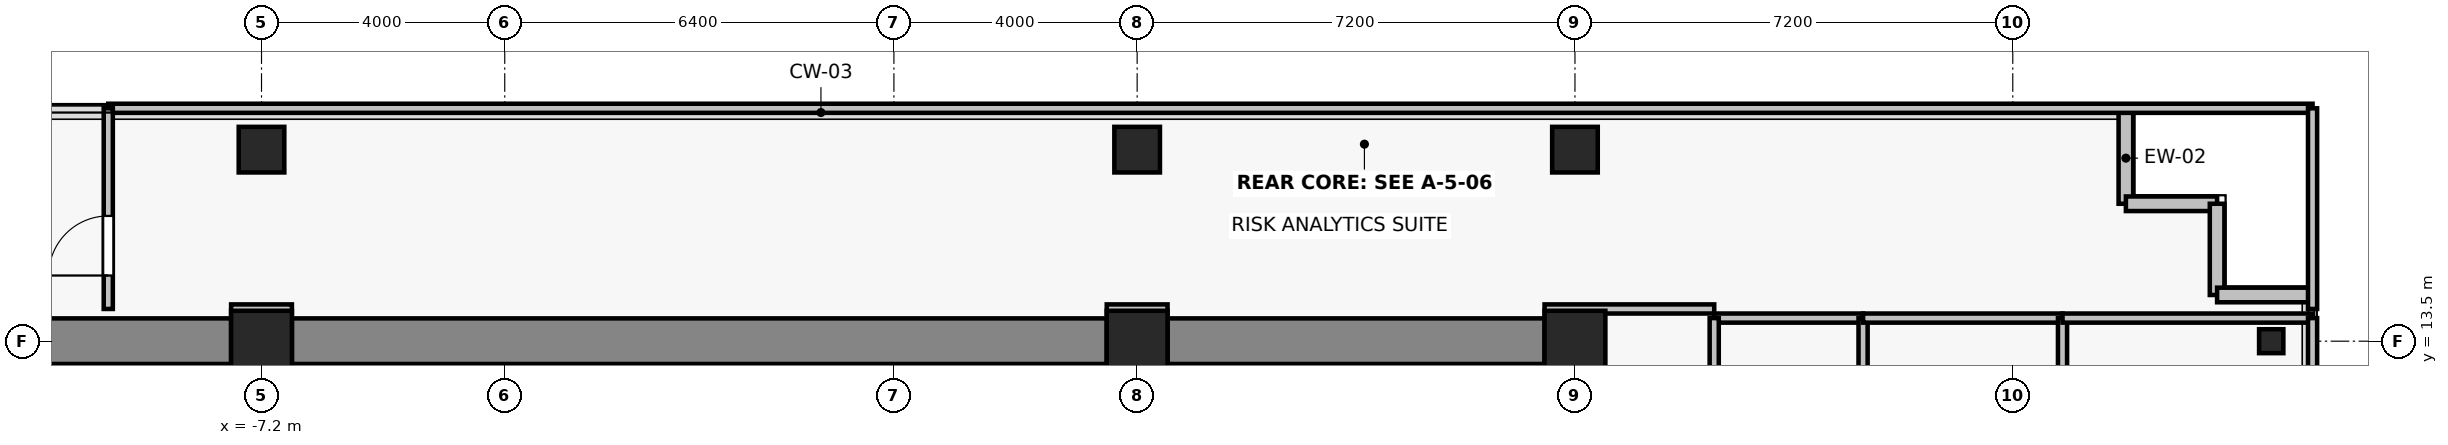
"""IFC4 building model, lengths in metres.
Left out: names, types, materials, properties, quantities, classifications, styles, units other than length and angle.
Written with IfcOpenShell. Run it as: python <this file> out.ifc"""

import sys

from ifc_helpers import new_model, si_unit, direction, frame, frame_2d, origin, origin_2d, place, context, subcontext, project, spatial, rectangle, i_section, extrude, source, transform, mapped, element, fill, save


model = new_model("IFC4")
c1 = context("Model", 3, precision=1e-05, world=origin(), true_north=direction((0.0, 1.0)))
c2 = subcontext(c1, "Body", "Model", "MODEL_VIEW")
j1 = project(units=[si_unit("LENGTHUNIT", "METRE"), si_unit("PLANEANGLEUNIT", "RADIAN")], contexts=[c1])
p1 = place(None, origin())
s1 = spatial("IfcSite", under=j1, at=p1, CompositionType="ELEMENT")
p2 = place(p1, origin())
s2 = spatial("IfcBuilding", under=s1, at=p2, CompositionType="ELEMENT")
p3 = place(p2, frame((0.0, 0.0, 182.5)))
s3 = spatial("IfcBuildingStorey", under=s2, at=p3, CompositionType="ELEMENT", Elevation=182.5)
for number, where, z_axis, x_axis in (
    (1, (-7.2, 13.5, 0.0), (0.0, 0.0, 1.0), (1.0, 0.0, 0.0)),
    (2, (7.2, 13.5, 0.0), (0.0, 0.0, 1.0), (1.0, 0.0, 0.0)),
    (3, (14.4, 13.5, 0.0), (0.0, 0.0, 1.0), (1.0, 0.0, 0.0)),
):
    element("IfcColumn", number, at=place(p3, frame(where, z_axis=z_axis, x_axis=x_axis)), inside=s3, PredefinedType="COLUMN", context=c2, shape_type="SweptSolid", body=[
        extrude(rectangle(XDim=1.0, YDim=1.0, at=origin_2d()), origin(), (0.0, 0.0, 1.0), 3.3),
    ])
for number, where, z_axis, x_axis in (
    (4, (-7.2, 16.65, 0.0), (0.0, 0.0, 1.0), (1.0, 0.0, 0.0)),
    (5, (7.2, 16.65, 0.0), (0.0, 0.0, 1.0), (1.0, 0.0, 0.0)),
    (6, (14.4, 16.65, 0.0), (0.0, 0.0, 1.0), (1.0, 0.0, 0.0)),
):
    element("IfcColumn", number, at=place(p3, frame(where, z_axis=z_axis, x_axis=x_axis)), inside=s3, PredefinedType="COLUMN", context=c2, shape_type="SweptSolid", body=[
        extrude(rectangle(XDim=0.75, YDim=0.75, at=origin_2d()), origin(), (0.0, 0.0, 1.0), 3.3),
    ])
p4 = place(p3, frame((25.85, 13.5, 0.0), z_axis=(0.0, 0.0, 1.0), x_axis=(1.0, 0.0, 0.0)))
e7 = element("IfcColumn", 7, at=p4, inside=s3, PredefinedType="COLUMN", context=c2, shape_type="SweptSolid", body=[
    extrude(i_section(OverallWidth=0.399, OverallDepth=0.394, WebThickness=0.023, FlangeThickness=0.037, FilletRadius=0.015, at=origin_2d()), origin(), (0.0, 0.0, 1.0), 3.3),
])
p5 = place(p3, frame((-13.9, 13.5, 0.0), z_axis=(0.0, 0.0, 1.0), x_axis=(1.0, 0.0, 0.0)))
e8 = element("IfcWall", 8, at=p5, inside=s3, PredefinedType="SHEAR", context=c2, shape_type="SweptSolid", body=[
    extrude(rectangle(XDim=6.2, YDim=0.75, at=frame_2d((3.1, 0.0))), origin(), (0.0, 0.0, 1.0), 3.075),
])
p6 = place(p3, frame((-6.7, 13.5, 0.0), z_axis=(0.0, 0.0, 1.0), x_axis=(1.0, 0.0, 0.0)))
e9 = element("IfcWall", 9, at=p6, inside=s3, PredefinedType="SHEAR", context=c2, shape_type="SweptSolid", body=[
    extrude(rectangle(XDim=13.4, YDim=0.75, at=frame_2d((6.7, 0.0))), origin(), (0.0, 0.0, 1.0), 3.075),
])
p7 = place(p3, frame((7.7, 13.5, 0.0), z_axis=(0.0, 0.0, 1.0), x_axis=(1.0, 0.0, 0.0)))
e10 = element("IfcWall", 10, at=p7, inside=s3, PredefinedType="SHEAR", context=c2, shape_type="SweptSolid", body=[
    extrude(rectangle(XDim=6.2, YDim=0.75, at=frame_2d((3.1, 0.0))), origin(), (0.0, 0.0, 1.0), 3.075),
])
for number, where, z_axis, x_axis in (
    (11, (23.46, 15.76, 0.0), (0.0, 0.0, 1.0), (0.0, 1.0, 0.0)),
    (12, (24.96, 15.76, 0.0), (0.0, 0.0, 1.0), (-1.0, 0.0, 0.0)),
    (13, (24.96, 14.26, 0.0), (0.0, 0.0, 1.0), (0.0, 1.0, 0.0)),
    (14, (26.46, 14.26, 0.0), (0.0, 0.0, 1.0), (-1.0, 0.0, 0.0)),
):
    element("IfcWall", number, at=place(p3, frame(where, z_axis=z_axis, x_axis=x_axis)), inside=s3, PredefinedType="SOLIDWALL", context=c2, shape_type="SweptSolid", body=[
        extrude(rectangle(XDim=1.5, YDim=0.24, at=frame_2d((0.75, 0.0))), origin(), (0.0, 0.0, 1.0), 3.075),
    ])
p8 = place(p3, frame((16.69, 13.88, 0.0), z_axis=(0.0, 0.0, 1.0), x_axis=(1.0, 0.0, 0.0)))
e15 = element("IfcWall", 15, at=p8, inside=s3, PredefinedType="PARTITIONING", context=c2, shape_type="SweptSolid", body=[
    extrude(rectangle(XDim=2.448, YDim=0.15, at=frame_2d((1.224, 0.0))), origin(), (0.0, 0.0, 1.0), 3.075),
])
for number, where, z_axis, x_axis in (
    (16, (16.69, -1.77, 0.0), (0.0, 0.0, 1.0), (0.0, 1.0, 0.0)),
    (17, (19.138, 13.88, 0.0), (0.0, 0.0, 1.0), (0.0, -1.0, 0.0)),
):
    element("IfcWall", number, at=place(p3, frame(where, z_axis=z_axis, x_axis=x_axis)), inside=s3, PredefinedType="PARTITIONING", context=c2, shape_type="SweptSolid", body=[
        extrude(rectangle(XDim=15.65, YDim=0.15, at=frame_2d((7.825, 0.0))), origin(), (0.0, 0.0, 1.0), 2.565),
    ])
p9 = place(p3, frame((19.138, 13.88, 0.0), z_axis=(0.0, 0.0, 1.0), x_axis=(1.0, 0.0, 0.0)))
e18 = element("IfcWall", 18, at=p9, inside=s3, PredefinedType="PARTITIONING", context=c2, shape_type="SweptSolid", body=[
    extrude(rectangle(XDim=3.28, YDim=0.15, at=frame_2d((1.64, 0.0))), origin(), (0.0, 0.0, 1.0), 3.075),
])
p10 = place(p3, frame((22.418, 13.88, 0.0), z_axis=(0.0, 0.0, 1.0), x_axis=(0.0, -1.0, 0.0)))
e19 = element("IfcWall", 19, at=p10, inside=s3, PredefinedType="PARTITIONING", context=c2, shape_type="SweptSolid", body=[
    extrude(rectangle(XDim=15.65, YDim=0.15, at=frame_2d((7.825, 0.0))), origin(), (0.0, 0.0, 1.0), 2.565),
])
p11 = place(p3, frame((22.418, 13.88, 0.0), z_axis=(0.0, 0.0, 1.0), x_axis=(1.0, 0.0, 0.0)))
e20 = element("IfcWall", 20, at=p11, inside=s3, PredefinedType="PARTITIONING", context=c2, shape_type="SweptSolid", body=[
    extrude(rectangle(XDim=4.112, YDim=0.15, at=frame_2d((2.056, 0.0))), origin(), (0.0, 0.0, 1.0), 3.075),
])
p12 = place(p3, frame((26.53, 13.88, 0.0), z_axis=(0.0, 0.0, 1.0), x_axis=(0.0, -1.0, 0.0)))
e21 = element("IfcWall", 21, at=p12, inside=s3, PredefinedType="PARTITIONING", context=c2, shape_type="SweptSolid", body=[
    extrude(rectangle(XDim=15.65, YDim=0.15, at=frame_2d((7.825, 0.0))), origin(), (0.0, 0.0, 1.0), 3.075),
])
for number, where, z_axis, x_axis in (
    (22, (-6.7, 14.03, 0.0), (0.0, 0.0, 1.0), (-1.0, 0.0, 0.0)),
    (23, (7.7, 14.03, 0.0), (0.0, 0.0, 1.0), (-1.0, 0.0, 0.0)),
):
    element("IfcWall", number, at=place(p3, frame(where, z_axis=z_axis, x_axis=x_axis)), inside=s3, PredefinedType="PARTITIONING", context=c2, shape_type="SweptSolid", body=[
        extrude(rectangle(XDim=1.0, YDim=0.15, at=frame_2d((0.5, 0.0))), origin(), (0.0, 0.0, 1.0), 2.565),
    ])
p13 = place(p3, frame((16.69, 14.03, 0.0), z_axis=(0.0, 0.0, 1.0), x_axis=(-1.0, 0.0, 0.0)))
e24 = element("IfcWall", 24, at=p13, inside=s3, PredefinedType="PARTITIONING", context=c2, shape_type="SweptSolid", body=[
    extrude(rectangle(XDim=2.79, YDim=0.15, at=frame_2d((1.395, 0.0))), origin(), (0.0, 0.0, 1.0), 2.565),
])
p14 = place(p3, frame((-9.72, 17.33, 0.0), z_axis=(0.0, 0.0, 1.0), x_axis=(1.0, 0.0, 0.0)))
e25 = element("IfcWall", 25, at=p14, inside=s3, PredefinedType="PARTITIONING", context=c2, shape_type="SweptSolid", body=[
    extrude(rectangle(XDim=36.25, YDim=0.15, at=frame_2d((18.125, 0.0))), origin(), (0.0, 0.0, 1.0), 3.075),
])
p15 = place(p3, frame((-9.72, 14.03, 0.0), z_axis=(0.0, 0.0, 1.0), x_axis=(0.0, 1.0, 0.0)))
e26 = element("IfcWall", 26, at=p15, inside=s3, PredefinedType="PARTITIONING", context=c2, shape_type="SweptSolid", body=[
    extrude(rectangle(XDim=3.3, YDim=0.15, at=frame_2d((1.65, 0.0))), origin(), (0.0, 0.0, 1.0), 2.565),
])
p16 = place(p15, frame((0.55, 0.0, 0.0)))
e27 = element("IfcOpeningElement", 27, at=p16, cuts=e26, PredefinedType="OPENING", context=c2, shape_type="SweptSolid", body=[
    extrude(rectangle(XDim=0.98, YDim=2.15, at=frame_2d((0.49, 1.075))), frame((0.0, 0.085, 0.0), z_axis=(0.0, -1.0, 0.0), x_axis=(1.0, 0.0, 0.0)), (0.0, 0.0, 1.0), 0.17),
])
p17 = place(p3, frame((26.53, 17.33, 0.0), z_axis=(0.0, 0.0, 1.0), x_axis=(0.0, -1.0, 0.0)))
e28 = element("IfcWall", 28, at=p17, inside=s3, PredefinedType="PARTITIONING", context=c2, shape_type="SweptSolid", body=[
    extrude(rectangle(XDim=3.3, YDim=0.15, at=frame_2d((1.65, 0.0))), origin(), (0.0, 0.0, 1.0), 3.075),
])
m1 = source(origin(), c2, "Body", "SweptSolid", [
    extrude(rectangle(XDim=0.98, YDim=2.15, at=frame_2d((0.49, 1.075))), frame((0.0, 0.025, 0.0), z_axis=(0.0, -1.0, 0.0), x_axis=(1.0, 0.0, 0.0)), (0.0, 0.0, 1.0), 0.05),
])
p18 = place(p16, origin())
e29 = element("IfcDoor", 29, at=p18, inside=s3, OperationType="SINGLE_SWING_LEFT", PredefinedType="DOOR", context=c2, shape_type="MappedRepresentation", body=[
    mapped(m1, transform((0.0, 0.0, 0.0), x_axis=(1.0, 0.0, 0.0), y_axis=(0.0, 1.0, 0.0), z_axis=(0.0, 0.0, 1.0), scale=1.0)),
])
fill(e27, e29)
save(model, sys.argv[1])
